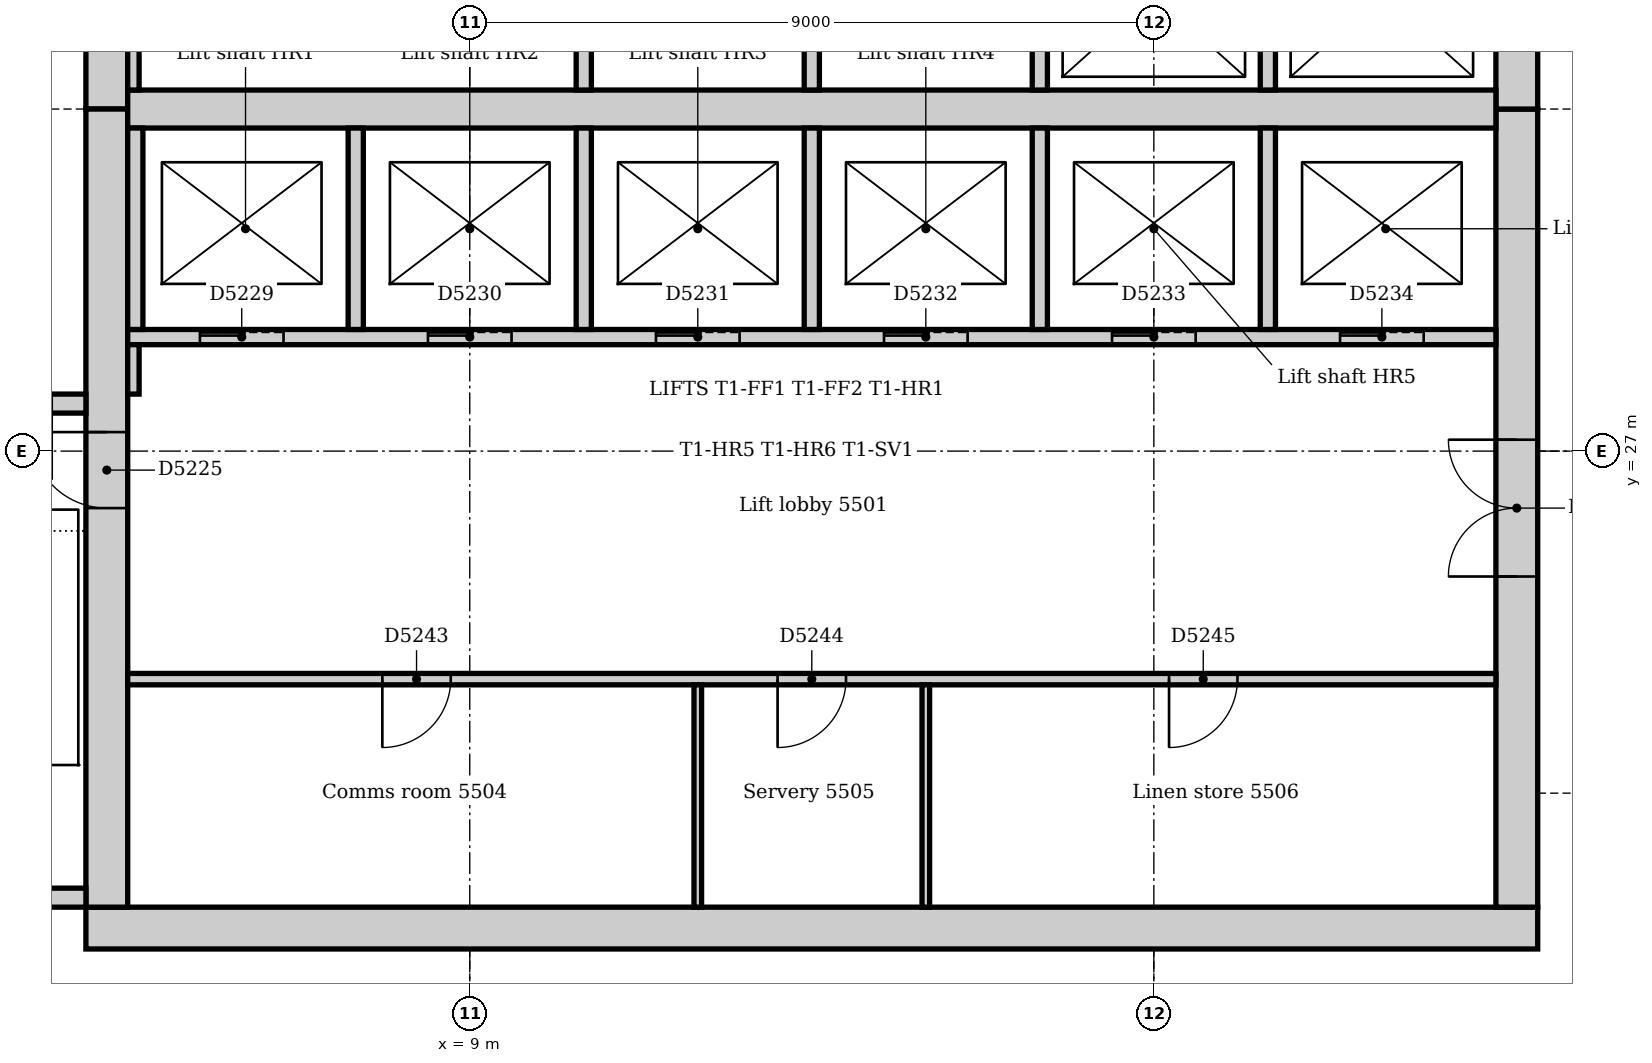
"""IFC4 building model, lengths in metres.
Left out: names, types, materials, properties, quantities, classifications, styles, units other than length and angle.
Written with IfcOpenShell. Run it as: python <this file> out.ifc"""

import sys

from ifc_helpers import new_model, si_unit, direction, frame, frame_2d, origin, place, context, subcontext, project, spatial, rectangle, extrude, element, fill, save


model = new_model("IFC4")
c1 = context("Model", 3, precision=1e-05, world=origin(), true_north=direction((0.0, 1.0)))
c2 = subcontext(c1, "Body", "Model", "MODEL_VIEW")
j1 = project(units=[si_unit("LENGTHUNIT", "METRE"), si_unit("PLANEANGLEUNIT", "RADIAN")], contexts=[c1])
p1 = place(None, origin())
s1 = spatial("IfcSite", under=j1, at=p1, CompositionType="ELEMENT")
p2 = place(p1, origin())
s2 = spatial("IfcBuilding", under=s1, at=p2, CompositionType="ELEMENT")
p3 = place(p2, frame((0.0, 0.0, 230.0)))
s3 = spatial("IfcBuildingStorey", under=s2, at=p3, CompositionType="ELEMENT", Elevation=230.0)
p4 = place(p3, frame((3.95, 20.725, 0.0), z_axis=(0.0, 0.0, 1.0), x_axis=(1.0, 0.0, 0.0)))
e1 = element("IfcWall", 1, at=p4, inside=s3, PredefinedType="SOLIDWALL", context=c2, shape_type="SweptSolid", body=[
    extrude(rectangle(XDim=19.1, YDim=0.55, at=frame_2d((9.55, 0.0))), origin(), (0.0, 0.0, 1.0), 4.0),
])
p5 = place(p3, frame((22.775, 21.0, 0.0), z_axis=(0.0, 0.0, 1.0), x_axis=(0.0, 1.0, 0.0)))
e2 = element("IfcWall", 2, at=p5, inside=s3, PredefinedType="SOLIDWALL", context=c2, shape_type="SweptSolid", body=[
    extrude(rectangle(XDim=10.5, YDim=0.55, at=frame_2d((5.25, 0.0))), origin(), (0.0, 0.0, 1.0), 4.0),
])
p6 = place(p5, frame((4.35, 0.0, 0.0)))
e3 = element("IfcOpeningElement", 3, at=p6, cuts=e2, PredefinedType="OPENING", context=c2, shape_type="SweptSolid", body=[
    extrude(rectangle(XDim=1.8, YDim=2.1, at=frame_2d((0.9, 1.05))), frame((0.0, 0.285, 0.0), z_axis=(0.0, -1.0, 0.0), x_axis=(1.0, 0.0, 0.0)), (0.0, 0.0, 1.0), 0.57),
])
p7 = place(p3, frame((22.775, 31.5, 0.0), z_axis=(0.0, 0.0, 1.0), x_axis=(0.0, 1.0, 0.0)))
e4 = element("IfcWall", 4, at=p7, inside=s3, PredefinedType="SOLIDWALL", context=c2, shape_type="SweptSolid", body=[
    extrude(rectangle(XDim=10.5, YDim=0.55, at=frame_2d((5.25, 0.0))), origin(), (0.0, 0.0, 1.0), 4.0),
])
p8 = place(p7, frame((3.15, 0.0, 0.0)))
e5 = element("IfcOpeningElement", 5, at=p8, cuts=e4, PredefinedType="OPENING", context=c2, shape_type="SweptSolid", body=[
    extrude(rectangle(XDim=1.0, YDim=2.1, at=frame_2d((0.5, 1.05))), frame((0.0, 0.285, 0.0), z_axis=(0.0, -1.0, 0.0), x_axis=(1.0, 0.0, 0.0)), (0.0, 0.0, 1.0), 0.57),
])
p9 = place(p7, frame((5.2, 0.0, 0.0)))
e6 = element("IfcOpeningElement", 6, at=p9, cuts=e4, PredefinedType="OPENING", context=c2, shape_type="SweptSolid", body=[
    extrude(rectangle(XDim=1.0, YDim=2.1, at=frame_2d((0.5, 1.05))), frame((0.0, 0.285, 0.0), z_axis=(0.0, -1.0, 0.0), x_axis=(1.0, 0.0, 0.0)), (0.0, 0.0, 1.0), 0.57),
])
p10 = place(p3, frame((4.225, 42.0, 0.0), z_axis=(0.0, 0.0, 1.0), x_axis=(0.0, -1.0, 0.0)))
e7 = element("IfcWall", 7, at=p10, inside=s3, PredefinedType="SOLIDWALL", context=c2, shape_type="SweptSolid", body=[
    extrude(rectangle(XDim=10.5, YDim=0.55, at=frame_2d((5.25, 0.0))), origin(), (0.0, 0.0, 1.0), 4.0),
])
p11 = place(p10, frame((5.3, 0.0, 0.0)))
e8 = element("IfcOpeningElement", 8, at=p11, cuts=e7, PredefinedType="OPENING", context=c2, shape_type="SweptSolid", body=[
    extrude(rectangle(XDim=1.0, YDim=2.1, at=frame_2d((0.5, 1.05))), frame((0.0, 0.285, 0.0), z_axis=(0.0, -1.0, 0.0), x_axis=(1.0, 0.0, 0.0)), (0.0, 0.0, 1.0), 0.57),
])
p12 = place(p3, frame((4.225, 31.5, 0.0), z_axis=(0.0, 0.0, 1.0), x_axis=(0.0, -1.0, 0.0)))
e9 = element("IfcWall", 9, at=p12, inside=s3, PredefinedType="SOLIDWALL", context=c2, shape_type="SweptSolid", body=[
    extrude(rectangle(XDim=10.5, YDim=0.55, at=frame_2d((5.25, 0.0))), origin(), (0.0, 0.0, 1.0), 4.0),
])
p13 = place(p12, frame((4.25, 0.0, 0.0)))
e10 = element("IfcOpeningElement", 10, at=p13, cuts=e9, PredefinedType="OPENING", context=c2, shape_type="SweptSolid", body=[
    extrude(rectangle(XDim=1.0, YDim=2.1, at=frame_2d((0.5, 1.05))), frame((0.0, 0.285, 0.0), z_axis=(0.0, -1.0, 0.0), x_axis=(1.0, 0.0, 0.0)), (0.0, 0.0, 1.0), 0.57),
])
p14 = place(p3, frame((4.5, 31.5, 0.0), z_axis=(0.0, 0.0, 1.0), x_axis=(1.0, 0.0, 0.0)))
e11 = element("IfcWall", 11, at=p14, inside=s3, PredefinedType="SOLIDWALL", context=c2, shape_type="SweptSolid", body=[
    extrude(rectangle(XDim=18.0, YDim=0.5, at=frame_2d((9.0, 0.0))), origin(), (0.0, 0.0, 1.0), 4.0),
])
p15 = place(p3, frame((0.36, 21.125, 0.0), z_axis=(0.0, 0.0, 1.0), x_axis=(1.0, 0.0, 0.0)))
e12 = element("IfcWall", 12, at=p15, inside=s3, PredefinedType="SOLIDWALL", context=c2, shape_type="SweptSolid", body=[
    extrude(rectangle(XDim=3.59, YDim=0.25, at=frame_2d((1.795, 0.0))), origin(), (0.0, 0.0, 1.0), 4.0),
])
p16 = place(p3, frame((3.95, 27.625, 0.0), z_axis=(0.0, 0.0, 1.0), x_axis=(-1.0, 0.0, 0.0)))
e13 = element("IfcWall", 13, at=p16, inside=s3, PredefinedType="SOLIDWALL", context=c2, shape_type="SweptSolid", body=[
    extrude(rectangle(XDim=3.59, YDim=0.25, at=frame_2d((1.795, 0.0))), origin(), (0.0, 0.0, 1.0), 4.0),
])
p17 = place(p16, frame((0.45, 0.0, 0.0)))
e14 = element("IfcOpeningElement", 14, at=p17, cuts=e13, PredefinedType="OPENING", context=c2, shape_type="SweptSolid", body=[
    extrude(rectangle(XDim=1.0, YDim=2.1, at=frame_2d((0.5, 1.05))), frame((0.0, 0.135, 0.0), z_axis=(0.0, -1.0, 0.0), x_axis=(1.0, 0.0, 0.0)), (0.0, 0.0, 1.0), 0.27),
])
p18 = place(p3, frame((4.5, 28.5, 0.0), z_axis=(0.0, 0.0, 1.0), x_axis=(1.0, 0.0, 0.0)))
e15 = element("IfcWall", 15, at=p18, inside=s3, PredefinedType="PARTITIONING", context=c2, shape_type="SweptSolid", body=[
    extrude(rectangle(XDim=18.0, YDim=0.2, at=frame_2d((9.0, 0.0))), origin(), (0.0, 0.0, 1.0), 3.85),
])
p19 = place(p18, frame((0.95, 0.0, 0.0)))
e16 = element("IfcOpeningElement", 16, at=p19, cuts=e15, PredefinedType="OPENING", context=c2, shape_type="SweptSolid", body=[
    extrude(rectangle(XDim=1.1, YDim=2.1, at=frame_2d((0.55, 1.05))), frame((0.0, 0.11, 0.0), z_axis=(0.0, -1.0, 0.0), x_axis=(1.0, 0.0, 0.0)), (0.0, 0.0, 1.0), 0.22),
])
p20 = place(p18, frame((3.95, 0.0, 0.0)))
e17 = element("IfcOpeningElement", 17, at=p20, cuts=e15, PredefinedType="OPENING", context=c2, shape_type="SweptSolid", body=[
    extrude(rectangle(XDim=1.1, YDim=2.1, at=frame_2d((0.55, 1.05))), frame((0.0, 0.11, 0.0), z_axis=(0.0, -1.0, 0.0), x_axis=(1.0, 0.0, 0.0)), (0.0, 0.0, 1.0), 0.22),
])
p21 = place(p18, frame((6.95, 0.0, 0.0)))
e18 = element("IfcOpeningElement", 18, at=p21, cuts=e15, PredefinedType="OPENING", context=c2, shape_type="SweptSolid", body=[
    extrude(rectangle(XDim=1.1, YDim=2.1, at=frame_2d((0.55, 1.05))), frame((0.0, 0.11, 0.0), z_axis=(0.0, -1.0, 0.0), x_axis=(1.0, 0.0, 0.0)), (0.0, 0.0, 1.0), 0.22),
])
p22 = place(p18, frame((9.95, 0.0, 0.0)))
e19 = element("IfcOpeningElement", 19, at=p22, cuts=e15, PredefinedType="OPENING", context=c2, shape_type="SweptSolid", body=[
    extrude(rectangle(XDim=1.1, YDim=2.1, at=frame_2d((0.55, 1.05))), frame((0.0, 0.11, 0.0), z_axis=(0.0, -1.0, 0.0), x_axis=(1.0, 0.0, 0.0)), (0.0, 0.0, 1.0), 0.22),
])
p23 = place(p18, frame((12.95, 0.0, 0.0)))
e20 = element("IfcOpeningElement", 20, at=p23, cuts=e15, PredefinedType="OPENING", context=c2, shape_type="SweptSolid", body=[
    extrude(rectangle(XDim=1.1, YDim=2.1, at=frame_2d((0.55, 1.05))), frame((0.0, 0.11, 0.0), z_axis=(0.0, -1.0, 0.0), x_axis=(1.0, 0.0, 0.0)), (0.0, 0.0, 1.0), 0.22),
])
p24 = place(p18, frame((15.95, 0.0, 0.0)))
e21 = element("IfcOpeningElement", 21, at=p24, cuts=e15, PredefinedType="OPENING", context=c2, shape_type="SweptSolid", body=[
    extrude(rectangle(XDim=1.1, YDim=2.1, at=frame_2d((0.55, 1.05))), frame((0.0, 0.11, 0.0), z_axis=(0.0, -1.0, 0.0), x_axis=(1.0, 0.0, 0.0)), (0.0, 0.0, 1.0), 0.22),
])
for number, where, z_axis, x_axis in (
    (22, (10.5, 28.6, 0.0), (0.0, 0.0, 1.0), (0.0, 1.0, 0.0)),
    (23, (10.5, 31.75, 0.0), (0.0, 0.0, 1.0), (0.0, 1.0, 0.0)),
    (24, (13.5, 28.6, 0.0), (0.0, 0.0, 1.0), (0.0, 1.0, 0.0)),
    (25, (13.5, 31.75, 0.0), (0.0, 0.0, 1.0), (0.0, 1.0, 0.0)),
    (26, (16.5, 28.6, 0.0), (0.0, 0.0, 1.0), (0.0, 1.0, 0.0)),
    (27, (16.5, 31.75, 0.0), (0.0, 0.0, 1.0), (0.0, 1.0, 0.0)),
    (28, (19.5, 28.6, 0.0), (0.0, 0.0, 1.0), (0.0, 1.0, 0.0)),
    (29, (19.5, 31.75, 0.0), (0.0, 0.0, 1.0), (0.0, 1.0, 0.0)),
    (30, (4.6, 28.6, 0.0), (0.0, 0.0, 1.0), (0.0, 1.0, 0.0)),
    (31, (7.5, 28.6, 0.0), (0.0, 0.0, 1.0), (0.0, 1.0, 0.0)),
):
    element("IfcWall", number, at=place(p3, frame(where, z_axis=z_axis, x_axis=x_axis)), inside=s3, PredefinedType="PARTITIONING", context=c2, shape_type="SweptSolid", body=[
        extrude(rectangle(XDim=2.65, YDim=0.2, at=frame_2d((1.325, 0.0))), origin(), (0.0, 0.0, 1.0), 3.85),
    ])
p25 = place(p3, frame((4.5, 24.0, 0.0), z_axis=(0.0, 0.0, 1.0), x_axis=(1.0, 0.0, 0.0)))
e32 = element("IfcWall", 32, at=p25, inside=s3, PredefinedType="PARTITIONING", context=c2, shape_type="SweptSolid", body=[
    extrude(rectangle(XDim=18.0, YDim=0.15, at=frame_2d((9.0, 0.0))), origin(), (0.0, 0.0, 1.0), 3.85),
])
p26 = place(p25, frame((3.35, 0.0, 0.0)))
e33 = element("IfcOpeningElement", 33, at=p26, cuts=e32, PredefinedType="OPENING", context=c2, shape_type="SweptSolid", body=[
    extrude(rectangle(XDim=0.9, YDim=2.1, at=frame_2d((0.45, 1.05))), frame((0.0, 0.085, 0.0), z_axis=(0.0, -1.0, 0.0), x_axis=(1.0, 0.0, 0.0)), (0.0, 0.0, 1.0), 0.17),
])
p27 = place(p25, frame((8.55, 0.0, 0.0)))
e34 = element("IfcOpeningElement", 34, at=p27, cuts=e32, PredefinedType="OPENING", context=c2, shape_type="SweptSolid", body=[
    extrude(rectangle(XDim=0.9, YDim=2.1, at=frame_2d((0.45, 1.05))), frame((0.0, 0.085, 0.0), z_axis=(0.0, -1.0, 0.0), x_axis=(1.0, 0.0, 0.0)), (0.0, 0.0, 1.0), 0.17),
])
p28 = place(p25, frame((13.7, 0.0, 0.0)))
e35 = element("IfcOpeningElement", 35, at=p28, cuts=e32, PredefinedType="OPENING", context=c2, shape_type="SweptSolid", body=[
    extrude(rectangle(XDim=0.9, YDim=2.1, at=frame_2d((0.45, 1.05))), frame((0.0, 0.085, 0.0), z_axis=(0.0, -1.0, 0.0), x_axis=(1.0, 0.0, 0.0)), (0.0, 0.0, 1.0), 0.17),
])
p29 = place(p3, frame((4.575, 31.75, 0.0), z_axis=(0.0, 0.0, 1.0), x_axis=(0.0, 1.0, 0.0)))
e36 = element("IfcWall", 36, at=p29, inside=s3, PredefinedType="PARTITIONING", context=c2, shape_type="SweptSolid", body=[
    extrude(rectangle(XDim=2.675, YDim=0.15, at=frame_2d((1.337, 0.0))), origin(), (0.0, 0.0, 1.0), 3.85),
])
p30 = place(p3, frame((4.575, 27.75, 0.0), z_axis=(0.0, 0.0, 1.0), x_axis=(0.0, 1.0, 0.0)))
e37 = element("IfcWall", 37, at=p30, inside=s3, PredefinedType="PARTITIONING", context=c2, shape_type="SweptSolid", body=[
    extrude(rectangle(XDim=0.65, YDim=0.15, at=frame_2d((0.325, 0.0))), origin(), (0.0, 0.0, 1.0), 3.85),
])
for number, where, z_axis, x_axis in (
    (38, (12.0, 21.0, 0.0), (0.0, 0.0, 1.0), (0.0, 1.0, 0.0)),
    (39, (15.0, 21.0, 0.0), (0.0, 0.0, 1.0), (0.0, 1.0, 0.0)),
):
    element("IfcWall", number, at=place(p3, frame(where, z_axis=z_axis, x_axis=x_axis)), inside=s3, PredefinedType="PARTITIONING", context=c2, shape_type="SweptSolid", body=[
        extrude(rectangle(XDim=2.925, YDim=0.1, at=frame_2d((1.462, 0.0))), origin(), (0.0, 0.0, 1.0), 3.85),
    ])
p31 = place(p13, frame((1.0, 0.0, 0.0), z_axis=(0.0, 0.0, 1.0), x_axis=(-1.0, 0.0, 0.0)))
e40 = element("IfcDoor", 40, at=p31, inside=s3, OperationType="SINGLE_SWING_RIGHT", PredefinedType="DOOR", context=c2, shape_type="SweptSolid", body=[
    extrude(rectangle(XDim=1.0, YDim=2.1, at=frame_2d((0.5, 1.05))), frame((0.0, 0.025, 0.0), z_axis=(0.0, -1.0, 0.0), x_axis=(1.0, 0.0, 0.0)), (0.0, 0.0, 1.0), 0.05),
])
fill(e10, e40)
p32 = place(p19, origin())
e41 = element("IfcDoor", 41, at=p32, inside=s3, OperationType="SLIDING_TO_LEFT", PredefinedType="DOOR", context=c2, shape_type="SweptSolid", body=[
    extrude(rectangle(XDim=1.1, YDim=2.1, at=frame_2d((0.55, 1.05))), frame((0.0, 0.025, 0.0), z_axis=(0.0, -1.0, 0.0), x_axis=(1.0, 0.0, 0.0)), (0.0, 0.0, 1.0), 0.05),
])
fill(e16, e41)
p33 = place(p20, origin())
e42 = element("IfcDoor", 42, at=p33, inside=s3, OperationType="SLIDING_TO_LEFT", PredefinedType="DOOR", context=c2, shape_type="SweptSolid", body=[
    extrude(rectangle(XDim=1.1, YDim=2.1, at=frame_2d((0.55, 1.05))), frame((0.0, 0.025, 0.0), z_axis=(0.0, -1.0, 0.0), x_axis=(1.0, 0.0, 0.0)), (0.0, 0.0, 1.0), 0.05),
])
fill(e17, e42)
p34 = place(p21, origin())
e43 = element("IfcDoor", 43, at=p34, inside=s3, OperationType="SLIDING_TO_LEFT", PredefinedType="DOOR", context=c2, shape_type="SweptSolid", body=[
    extrude(rectangle(XDim=1.1, YDim=2.1, at=frame_2d((0.55, 1.05))), frame((0.0, 0.025, 0.0), z_axis=(0.0, -1.0, 0.0), x_axis=(1.0, 0.0, 0.0)), (0.0, 0.0, 1.0), 0.05),
])
fill(e18, e43)
p35 = place(p22, origin())
e44 = element("IfcDoor", 44, at=p35, inside=s3, OperationType="SLIDING_TO_LEFT", PredefinedType="DOOR", context=c2, shape_type="SweptSolid", body=[
    extrude(rectangle(XDim=1.1, YDim=2.1, at=frame_2d((0.55, 1.05))), frame((0.0, 0.025, 0.0), z_axis=(0.0, -1.0, 0.0), x_axis=(1.0, 0.0, 0.0)), (0.0, 0.0, 1.0), 0.05),
])
fill(e19, e44)
p36 = place(p23, origin())
e45 = element("IfcDoor", 45, at=p36, inside=s3, OperationType="SLIDING_TO_LEFT", PredefinedType="DOOR", context=c2, shape_type="SweptSolid", body=[
    extrude(rectangle(XDim=1.1, YDim=2.1, at=frame_2d((0.55, 1.05))), frame((0.0, 0.025, 0.0), z_axis=(0.0, -1.0, 0.0), x_axis=(1.0, 0.0, 0.0)), (0.0, 0.0, 1.0), 0.05),
])
fill(e20, e45)
p37 = place(p24, origin())
e46 = element("IfcDoor", 46, at=p37, inside=s3, OperationType="SLIDING_TO_LEFT", PredefinedType="DOOR", context=c2, shape_type="SweptSolid", body=[
    extrude(rectangle(XDim=1.1, YDim=2.1, at=frame_2d((0.55, 1.05))), frame((0.0, 0.025, 0.0), z_axis=(0.0, -1.0, 0.0), x_axis=(1.0, 0.0, 0.0)), (0.0, 0.0, 1.0), 0.05),
])
fill(e21, e46)
p38 = place(p6, origin())
e47 = element("IfcDoor", 47, at=p38, inside=s3, OperationType="DOUBLE_DOOR_DOUBLE_SWING", PredefinedType="DOOR", context=c2, shape_type="SweptSolid", body=[
    extrude(rectangle(XDim=1.8, YDim=2.1, at=frame_2d((0.9, 1.05))), frame((0.0, 0.025, 0.0), z_axis=(0.0, -1.0, 0.0), x_axis=(1.0, 0.0, 0.0)), (0.0, 0.0, 1.0), 0.05),
])
fill(e3, e47)
p39 = place(p26, frame((0.9, 0.0, 0.0), z_axis=(0.0, 0.0, 1.0), x_axis=(-1.0, 0.0, 0.0)))
e48 = element("IfcDoor", 48, at=p39, inside=s3, OperationType="SINGLE_SWING_RIGHT", PredefinedType="DOOR", context=c2, shape_type="SweptSolid", body=[
    extrude(rectangle(XDim=0.9, YDim=2.1, at=frame_2d((0.45, 1.05))), frame((0.0, 0.025, 0.0), z_axis=(0.0, -1.0, 0.0), x_axis=(1.0, 0.0, 0.0)), (0.0, 0.0, 1.0), 0.05),
])
fill(e33, e48)
p40 = place(p27, frame((0.9, 0.0, 0.0), z_axis=(0.0, 0.0, 1.0), x_axis=(-1.0, 0.0, 0.0)))
e49 = element("IfcDoor", 49, at=p40, inside=s3, OperationType="SINGLE_SWING_RIGHT", PredefinedType="DOOR", context=c2, shape_type="SweptSolid", body=[
    extrude(rectangle(XDim=0.9, YDim=2.1, at=frame_2d((0.45, 1.05))), frame((0.0, 0.025, 0.0), z_axis=(0.0, -1.0, 0.0), x_axis=(1.0, 0.0, 0.0)), (0.0, 0.0, 1.0), 0.05),
])
fill(e34, e49)
p41 = place(p28, frame((0.9, 0.0, 0.0), z_axis=(0.0, 0.0, 1.0), x_axis=(-1.0, 0.0, 0.0)))
e50 = element("IfcDoor", 50, at=p41, inside=s3, OperationType="SINGLE_SWING_RIGHT", PredefinedType="DOOR", context=c2, shape_type="SweptSolid", body=[
    extrude(rectangle(XDim=0.9, YDim=2.1, at=frame_2d((0.45, 1.05))), frame((0.0, 0.025, 0.0), z_axis=(0.0, -1.0, 0.0), x_axis=(1.0, 0.0, 0.0)), (0.0, 0.0, 1.0), 0.05),
])
fill(e35, e50)
save(model, sys.argv[1])
